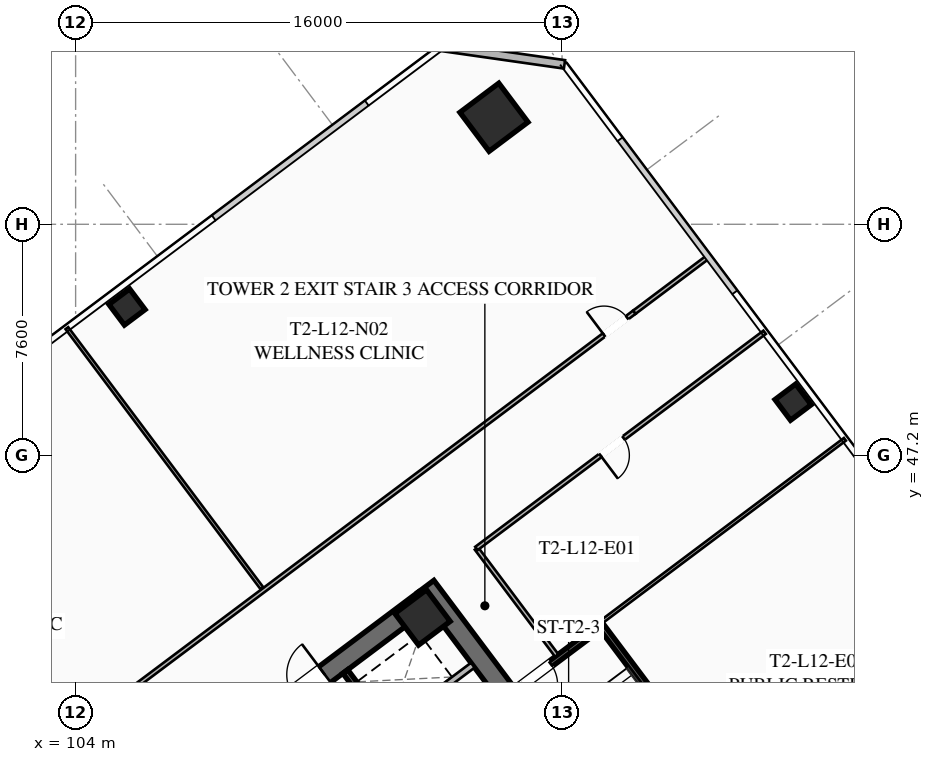
"""IFC4 building model, lengths in metres.
Left out: names, types, materials, properties, quantities, classifications, styles, units other than length and angle.
Written with IfcOpenShell. Run it as: python <this file> out.ifc"""

import sys

from ifc_helpers import new_model, si_unit, direction, frame, frame_2d, origin, origin_2d, place, context, subcontext, project, spatial, rectangle, hollow_rectangle, extrude, element, fill, save


model = new_model("IFC4")
c1 = context("Model", 3, precision=1e-05, world=origin(), true_north=direction((0.0, 1.0)))
c2 = subcontext(c1, "Body", "Model", "MODEL_VIEW")
j1 = project(units=[si_unit("LENGTHUNIT", "METRE"), si_unit("PLANEANGLEUNIT", "RADIAN")], contexts=[c1])
p1 = place(None, origin())
s1 = spatial("IfcSite", under=j1, at=p1, CompositionType="ELEMENT")
p2 = place(p1, origin())
s2 = spatial("IfcBuilding", under=s1, at=p2, CompositionType="ELEMENT")
p3 = place(p2, frame((0.0, 0.0, 49.45)))
s3 = spatial("IfcBuildingStorey", under=s2, at=p3, CompositionType="ELEMENT", Elevation=49.45)
p4 = place(p3, frame((115.524, 42.893, 0.0), z_axis=(0.0, 0.0, 1.0), x_axis=(0.600005007985, -0.799996243986, 0.0)))
e1 = element("IfcWall", 1, at=p4, inside=s3, PredefinedType="SHEAR", context=c2, shape_type="SweptSolid", body=[
    extrude(rectangle(XDim=15.6, YDim=0.65, at=frame_2d((7.8, 0.0))), origin(), (0.0, 0.0, 1.0), 3.55),
])
p5 = place(p3, frame((103.571, 33.522, 0.0), z_axis=(0.0, 0.0, 1.0), x_axis=(0.799998028465, 0.600002628705, 0.0)))
e2 = element("IfcWall", 2, at=p5, inside=s3, PredefinedType="SHEAR", context=c2, shape_type="SweptSolid", body=[
    extrude(rectangle(XDim=14.86, YDim=0.65, at=frame_2d((7.43, 0.0))), origin(), (0.0, 0.0, 1.0), 3.55),
])
p6 = place(p5, frame((4.48, 0.0, 0.0)))
e3 = element("IfcOpeningElement", 3, at=p6, cuts=e2, PredefinedType="OPENING", context=c2, shape_type="SweptSolid", body=[
    extrude(rectangle(XDim=1.25, YDim=2.25, at=frame_2d((0.625, 1.125))), frame((0.0, 0.335, 0.0), z_axis=(0.0, -1.0, 0.0), x_axis=(1.0, 0.0, 0.0)), (0.0, 0.0, 1.0), 0.67),
])
p7 = place(p5, frame((9.53, 0.0, 0.0)))
e4 = element("IfcOpeningElement", 4, at=p7, cuts=e2, PredefinedType="OPENING", context=c2, shape_type="SweptSolid", body=[
    extrude(rectangle(XDim=1.25, YDim=2.25, at=frame_2d((0.625, 1.125))), frame((0.0, 0.335, 0.0), z_axis=(0.0, -1.0, 0.0), x_axis=(1.0, 0.0, 0.0)), (0.0, 0.0, 1.0), 0.67),
])
p8 = place(p3, frame((115.41, 41.87, 0.0), z_axis=(0.0, 0.0, 1.0), x_axis=(0.799999996291, 0.600000004945, 0.0)))
e5 = element("IfcColumn", 5, at=p8, inside=s3, PredefinedType="COLUMN", context=c2, shape_type="SweptSolid", body=[
    extrude(hollow_rectangle(XDim=1.3, YDim=1.3, WallThickness=0.05, at=origin_2d()), origin(), (0.0, 0.0, 1.0), 3.35),
])
p9 = place(p3, frame((117.76, 58.32, 0.0), z_axis=(0.0, 0.0, 1.0), x_axis=(0.799999996291, 0.600000004945, 0.0)))
e6 = element("IfcColumn", 6, at=p9, inside=s3, PredefinedType="COLUMN", context=c2, shape_type="SweptSolid", body=[
    extrude(hollow_rectangle(XDim=1.6, YDim=1.6, WallThickness=0.06, at=origin_2d()), origin(), (0.0, 0.0, 1.0), 3.35),
])
for number, where, z_axis, x_axis in (
    (7, (127.6, 48.95, 0.0), (0.0, 0.0, 1.0), (0.8, 0.6, 0.0)),
    (8, (105.69, 52.08, 0.0), (0.0, 0.0, 1.0), (0.8, 0.6, 0.0)),
):
    element("IfcColumn", number, at=place(p3, frame(where, z_axis=z_axis, x_axis=x_axis)), inside=s3, PredefinedType="COLUMN", context=c2, shape_type="SweptSolid", body=[
        extrude(hollow_rectangle(XDim=0.85, YDim=0.85, WallThickness=0.035, at=origin_2d()), origin(), (0.0, 0.0, 1.0), 3.35),
    ])
p10 = place(p3, frame((116.02, 60.64, 0.0), z_axis=(0.0, 0.0, 1.0), x_axis=(0.989955445613, -0.14137968631, 0.0)))
e9 = element("IfcWall", 9, at=p10, inside=s3, PredefinedType="SOLIDWALL", context=c2, shape_type="SweptSolid", body=[
    extrude(rectangle(XDim=4.101, YDim=0.28, at=frame_2d((2.051, 0.0))), origin(), (0.0, 0.0, 1.0), 3.35),
])
p11 = place(p3, frame((112.87, 40.09, 0.0), z_axis=(0.0, 0.0, 1.0), x_axis=(0.599975393228, -0.800018454488, 0.0)))
e10 = element("IfcWall", 10, at=p11, inside=s3, PredefinedType="SHEAR", context=c2, shape_type="SweptSolid", body=[
    extrude(rectangle(XDim=6.35, YDim=0.2, at=frame_2d((3.175, 0.0))), origin(), (0.0, 0.0, 1.0), 3.35),
])
p12 = place(p3, frame((114.36, 38.27, 0.0), z_axis=(0.0, 0.0, 1.0), x_axis=(0.799973995579, 0.600034670996, 0.0)))
e11 = element("IfcWall", 11, at=p12, inside=s3, PredefinedType="SOLIDWALL", context=c2, shape_type="SweptSolid", body=[
    extrude(rectangle(XDim=3.38, YDim=0.2, at=frame_2d((1.69, 0.0))), origin(), (0.0, 0.0, 1.0), 3.35),
])
p13 = place(p3, frame((125.304, 36.228, 0.0), z_axis=(0.0, 0.0, 1.0), x_axis=(-0.59998851072, 0.800008616831, 0.0)))
e12 = element("IfcWall", 12, at=p13, inside=s3, PredefinedType="SHEAR", context=c2, shape_type="SweptSolid", body=[
    extrude(rectangle(XDim=6.8, YDim=0.2, at=frame_2d((3.4, 0.0))), origin(), (0.0, 0.0, 1.0), 3.35),
])
p14 = place(p3, frame((121.204, 41.528, 0.0), z_axis=(0.0, 0.0, 1.0), x_axis=(-0.800017232136, -0.599977023131, 0.0)))
e13 = element("IfcWall", 13, at=p14, inside=s3, PredefinedType="SHEAR", context=c2, shape_type="SweptSolid", body=[
    extrude(rectangle(XDim=3.4, YDim=0.2, at=frame_2d((1.7, 0.0))), origin(), (0.0, 0.0, 1.0), 3.35),
])
p15 = place(p14, frame((1.975, 0.0, 0.0)))
e14 = element("IfcOpeningElement", 14, at=p15, cuts=e13, PredefinedType="OPENING", context=c2, shape_type="SweptSolid", body=[
    extrude(rectangle(XDim=1.15, YDim=2.2, at=frame_2d((0.575, 1.1))), frame((0.0, 0.11, 0.0), z_axis=(0.0, -1.0, 0.0), x_axis=(1.0, 0.0, 0.0)), (0.0, 0.0, 1.0), 0.22),
])
p16 = place(p3, frame((119.824, 40.618, 0.0), z_axis=(0.0, 0.0, 1.0), x_axis=(-0.599982243973, 0.800013316712, 0.0)))
e15 = element("IfcWall", 15, at=p16, inside=s3, PredefinedType="PARTITIONING", context=c2, shape_type="SweptSolid", body=[
    extrude(rectangle(XDim=4.4, YDim=0.135, at=frame_2d((2.2, 0.0))), origin(), (0.0, 0.0, 1.0), 2.703),
])
p17 = place(p3, frame((98.516, 34.012, 0.0), z_axis=(0.0, 0.0, 1.0), x_axis=(0.799998035726, 0.600002619023, 0.0)))
e16 = element("IfcWall", 16, at=p17, inside=s3, PredefinedType="PARTITIONING", context=c2, shape_type="SweptSolid", body=[
    extrude(rectangle(XDim=29.83, YDim=0.135, at=frame_2d((14.915, 0.0))), origin(), (0.0, 0.0, 1.0), 2.703),
])
p18 = place(p17, frame((0.3, 0.0, 0.0)))
e17 = element("IfcOpeningElement", 17, at=p18, cuts=e16, PredefinedType="OPENING", context=c2, shape_type="SweptSolid", body=[
    extrude(rectangle(XDim=0.95, YDim=2.05, at=frame_2d((0.475, 1.025))), frame((0.0, 0.077, 0.0), z_axis=(0.0, -1.0, 0.0), x_axis=(1.0, 0.0, 0.0)), (0.0, 0.0, 1.0), 0.155),
])
p19 = place(p17, frame((28.58, 0.0, 0.0)))
e18 = element("IfcOpeningElement", 18, at=p19, cuts=e16, PredefinedType="OPENING", context=c2, shape_type="SweptSolid", body=[
    extrude(rectangle(XDim=0.95, YDim=2.05, at=frame_2d((0.475, 1.025))), frame((0.0, 0.077, 0.0), z_axis=(0.0, -1.0, 0.0), x_axis=(1.0, 0.0, 0.0)), (0.0, 0.0, 1.0), 0.155),
])
p20 = place(p3, frame((122.38, 51.91, 0.0), z_axis=(0.0, 0.0, 1.0), x_axis=(0.799990331366, 0.600012891296, 0.0)))
e19 = element("IfcWall", 19, at=p20, inside=s3, PredefinedType="PARTITIONING", context=c2, shape_type="SweptSolid", body=[
    extrude(rectangle(XDim=3.03, YDim=0.135, at=frame_2d((1.515, 0.0))), origin(), (0.0, 0.0, 1.0), 2.703),
])
p21 = place(p3, frame((110.132, 42.824, 0.0), z_axis=(0.0, 0.0, 1.0), x_axis=(-0.600007301277, 0.79999452399, 0.0)))
e20 = element("IfcWall", 20, at=p21, inside=s3, PredefinedType="PARTITIONING", context=c2, shape_type="SweptSolid", body=[
    extrude(rectangle(XDim=10.7, YDim=0.11, at=frame_2d((5.35, 0.0))), origin(), (0.0, 0.0, 1.0), 2.703),
])
p22 = place(p3, frame((126.664, 51.248, 0.0), z_axis=(0.0, 0.0, 1.0), x_axis=(-0.799995055373, -0.600006592779, 0.0)))
e21 = element("IfcWall", 21, at=p22, inside=s3, PredefinedType="PARTITIONING", context=c2, shape_type="SweptSolid", body=[
    extrude(rectangle(XDim=11.85, YDim=0.135, at=frame_2d((5.925, 0.0))), origin(), (0.0, 0.0, 1.0), 2.703),
])
p23 = place(p22, frame((5.8, 0.0, 0.0)))
e22 = element("IfcOpeningElement", 22, at=p23, cuts=e21, PredefinedType="OPENING", context=c2, shape_type="SweptSolid", body=[
    extrude(rectangle(XDim=0.95, YDim=2.05, at=frame_2d((0.475, 1.025))), frame((0.0, 0.077, 0.0), z_axis=(0.0, -1.0, 0.0), x_axis=(1.0, 0.0, 0.0)), (0.0, 0.0, 1.0), 0.155),
])
p24 = place(p3, frame((129.304, 47.728, 0.0), z_axis=(0.0, 0.0, 1.0), x_axis=(-0.8, -0.6, 0.0)))
e23 = element("IfcWall", 23, at=p24, inside=s3, PredefinedType="PARTITIONING", context=c2, shape_type="SweptSolid", body=[
    extrude(rectangle(XDim=10.0, YDim=0.11, at=frame_2d((5.0, 0.0))), origin(), (0.0, 0.0, 1.0), 2.703),
])
p25 = place(p7, origin())
e24 = element("IfcDoor", 24, at=p25, inside=s3, OperationType="SINGLE_SWING_RIGHT", PredefinedType="DOOR", context=c2, shape_type="SweptSolid", body=[
    extrude(rectangle(XDim=1.25, YDim=2.25, at=frame_2d((0.625, 1.125))), frame((0.0, 0.025, 0.0), z_axis=(0.0, -1.0, 0.0), x_axis=(1.0, 0.0, 0.0)), (0.0, 0.0, 1.0), 0.05),
])
fill(e4, e24)
p26 = place(p15, origin())
e25 = element("IfcDoor", 25, at=p26, inside=s3, OperationType="SINGLE_SWING_RIGHT", PredefinedType="DOOR", context=c2, shape_type="SweptSolid", body=[
    extrude(rectangle(XDim=1.15, YDim=2.2, at=frame_2d((0.575, 1.1))), frame((0.0, 0.025, 0.0), z_axis=(0.0, -1.0, 0.0), x_axis=(1.0, 0.0, 0.0)), (0.0, 0.0, 1.0), 0.05),
])
fill(e14, e25)
p27 = place(p19, origin())
e26 = element("IfcDoor", 26, at=p27, inside=s3, OperationType="SINGLE_SWING_LEFT", PredefinedType="DOOR", context=c2, shape_type="SweptSolid", body=[
    extrude(rectangle(XDim=0.95, YDim=2.05, at=frame_2d((0.475, 1.025))), frame((0.0, 0.025, 0.0), z_axis=(0.0, -1.0, 0.0), x_axis=(1.0, 0.0, 0.0)), (0.0, 0.0, 1.0), 0.05),
])
fill(e18, e26)
p28 = place(p23, origin())
e27 = element("IfcDoor", 27, at=p28, inside=s3, OperationType="SINGLE_SWING_RIGHT", PredefinedType="DOOR", context=c2, shape_type="SweptSolid", body=[
    extrude(rectangle(XDim=0.95, YDim=2.05, at=frame_2d((0.475, 1.025))), frame((0.0, 0.025, 0.0), z_axis=(0.0, -1.0, 0.0), x_axis=(1.0, 0.0, 0.0)), (0.0, 0.0, 1.0), 0.05),
])
fill(e22, e27)
save(model, sys.argv[1])
